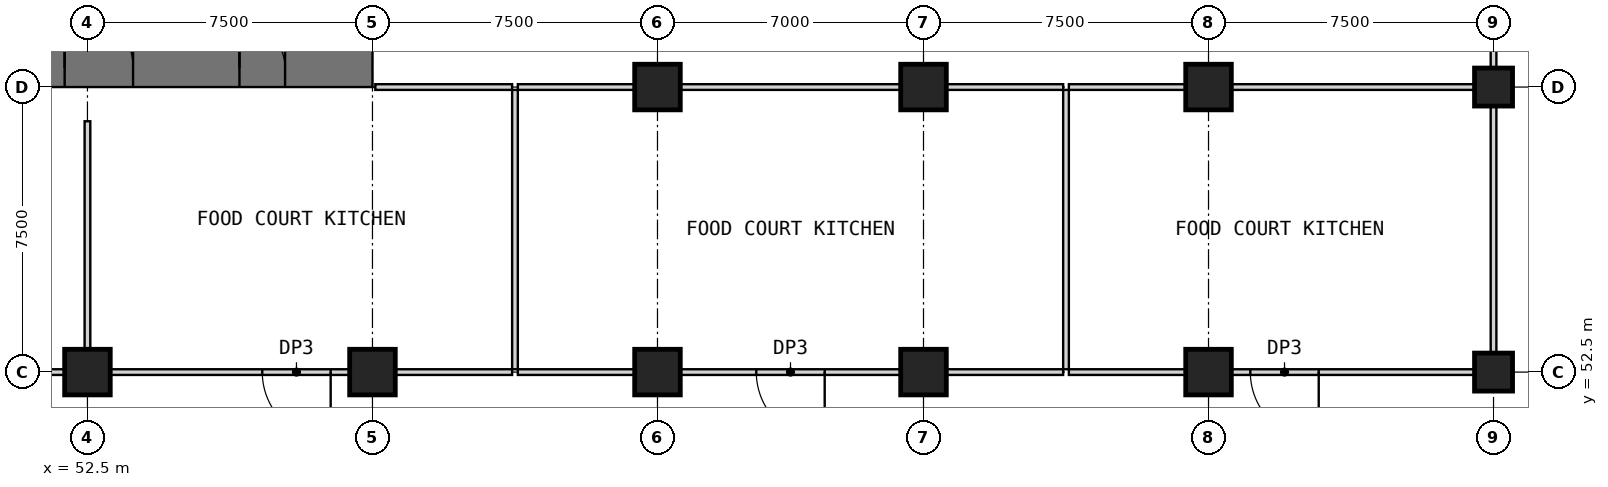
"""IFC4 building model, lengths in metres.
Left out: names, types, materials, properties, quantities, classifications, styles, units other than length and angle.
Written with IfcOpenShell. Run it as: python <this file> out.ifc"""

import sys

from ifc_helpers import new_model, si_unit, direction, frame, frame_2d, origin, origin_2d, place, context, subcontext, project, spatial, rectangle, extrude, element, fill, save


model = new_model("IFC4")
c1 = context("Model", 3, precision=1e-05, world=origin(), true_north=direction((0.0, 1.0)))
c2 = subcontext(c1, "Body", "Model", "MODEL_VIEW")
j1 = project(units=[si_unit("LENGTHUNIT", "METRE"), si_unit("PLANEANGLEUNIT", "RADIAN")], contexts=[c1])
p1 = place(None, origin())
s1 = spatial("IfcSite", under=j1, at=p1, CompositionType="ELEMENT")
p2 = place(p1, origin())
s2 = spatial("IfcBuilding", under=s1, at=p2, CompositionType="ELEMENT")
p3 = place(p2, frame((0.0, 0.0, 18.5)))
s3 = spatial("IfcBuildingStorey", under=s2, at=p3, CompositionType="ELEMENT", Elevation=18.5)
for number, where, z_axis, x_axis in (
    (1, (52.5, 52.5, 0.0), (0.0, 0.0, 1.0), (1.0, 0.0, 0.0)),
    (2, (60.0, 52.5, 0.0), (0.0, 0.0, 1.0), (1.0, 0.0, 0.0)),
    (3, (67.5, 52.5, 0.0), (0.0, 0.0, 1.0), (1.0, 0.0, 0.0)),
    (4, (67.5, 60.0, 0.0), (0.0, 0.0, 1.0), (1.0, 0.0, 0.0)),
    (5, (74.5, 52.5, 0.0), (0.0, 0.0, 1.0), (1.0, 0.0, 0.0)),
    (6, (74.5, 60.0, 0.0), (0.0, 0.0, 1.0), (1.0, 0.0, 0.0)),
    (7, (82.0, 52.5, 0.0), (0.0, 0.0, 1.0), (1.0, 0.0, 0.0)),
    (8, (82.0, 60.0, 0.0), (0.0, 0.0, 1.0), (1.0, 0.0, 0.0)),
):
    element("IfcColumn", number, at=place(p3, frame(where, z_axis=z_axis, x_axis=x_axis)), inside=s3, PredefinedType="COLUMN", context=c2, shape_type="SweptSolid", body=[
        extrude(rectangle(XDim=1.2, YDim=1.2, at=origin_2d()), origin(), (0.0, 0.0, 1.0), 5.0),
    ])
for number, where, z_axis, x_axis in (
    (9, (89.5, 52.5, 0.0), (0.0, 0.0, 1.0), (1.0, 0.0, 0.0)),
    (10, (89.5, 60.0, 0.0), (0.0, 0.0, 1.0), (1.0, 0.0, 0.0)),
):
    element("IfcColumn", number, at=place(p3, frame(where, z_axis=z_axis, x_axis=x_axis)), inside=s3, PredefinedType="COLUMN", context=c2, shape_type="SweptSolid", body=[
        extrude(rectangle(XDim=1.0, YDim=1.0, at=origin_2d()), origin(), (0.0, 0.0, 1.0), 5.0),
    ])
p4 = place(p3, frame((30.0, 60.5, 0.0), z_axis=(0.0, 0.0, 1.0), x_axis=(1.0, 0.0, 0.0)))
e11 = element("IfcWall", 11, at=p4, inside=s3, PredefinedType="SHEAR", context=c2, shape_type="SweptSolid", body=[
    extrude(rectangle(XDim=30.0, YDim=1.0, at=frame_2d((15.0, 0.0))), origin(), (0.0, 0.0, 1.0), 5.0),
])
p5 = place(p4, frame((21.9, 0.0, 0.0)))
e12 = element("IfcOpeningElement", 12, at=p5, cuts=e11, PredefinedType="OPENING", context=c2, shape_type="SweptSolid", body=[
    extrude(rectangle(XDim=1.8, YDim=2.1, at=frame_2d((0.9, 1.05))), frame((0.0, 0.51, 0.0), z_axis=(0.0, -1.0, 0.0), x_axis=(1.0, 0.0, 0.0)), (0.0, 0.0, 1.0), 1.02),
])
p6 = place(p4, frame((26.5, 0.0, 0.0)))
e13 = element("IfcOpeningElement", 13, at=p6, cuts=e11, PredefinedType="OPENING", context=c2, shape_type="SweptSolid", body=[
    extrude(rectangle(XDim=1.2, YDim=2.1, at=frame_2d((0.6, 1.05))), frame((0.0, 0.51, 0.0), z_axis=(0.0, -1.0, 0.0), x_axis=(1.0, 0.0, 0.0)), (0.0, 0.0, 1.0), 1.02),
])
p7 = place(p3, frame((51.9, 52.5, 0.0), z_axis=(0.0, 0.0, 1.0), x_axis=(-1.0, 0.0, 0.0)))
e14 = element("IfcWall", 14, at=p7, inside=s3, PredefinedType="PARTITIONING", context=c2, shape_type="SweptSolid", body=[
    extrude(rectangle(XDim=6.3, YDim=0.15, at=frame_2d((3.15, 0.0))), origin(), (0.0, 0.0, 1.0), 4.7),
])
p8 = place(p7, frame((4.0, 0.0, 0.0)))
e15 = element("IfcOpeningElement", 15, at=p8, cuts=e14, PredefinedType="OPENING", context=c2, shape_type="SweptSolid", body=[
    extrude(rectangle(XDim=1.8, YDim=2.4, at=frame_2d((0.9, 1.2))), frame((0.0, 0.085, 0.0), z_axis=(0.0, -1.0, 0.0), x_axis=(1.0, 0.0, 0.0)), (0.0, 0.0, 1.0), 0.17),
])
p9 = place(p3, frame((59.4, 52.5, 0.0), z_axis=(0.0, 0.0, 1.0), x_axis=(-1.0, 0.0, 0.0)))
e16 = element("IfcWall", 16, at=p9, inside=s3, PredefinedType="PARTITIONING", context=c2, shape_type="SweptSolid", body=[
    extrude(rectangle(XDim=6.3, YDim=0.15, at=frame_2d((3.15, 0.0))), origin(), (0.0, 0.0, 1.0), 4.7),
])
p10 = place(p9, frame((0.5, 0.0, 0.0)))
e17 = element("IfcOpeningElement", 17, at=p10, cuts=e16, PredefinedType="OPENING", context=c2, shape_type="SweptSolid", body=[
    extrude(rectangle(XDim=1.8, YDim=2.4, at=frame_2d((0.9, 1.2))), frame((0.0, 0.085, 0.0), z_axis=(0.0, -1.0, 0.0), x_axis=(1.0, 0.0, 0.0)), (0.0, 0.0, 1.0), 0.17),
])
for number, where, z_axis, x_axis in (
    (18, (60.6, 52.5, 0.0), (0.0, 0.0, 1.0), (1.0, 0.0, 0.0)),
    (19, (63.825, 52.5, 0.0), (0.0, 0.0, 1.0), (1.0, 0.0, 0.0)),
):
    element("IfcWall", number, at=place(p3, frame(where, z_axis=z_axis, x_axis=x_axis)), inside=s3, PredefinedType="PARTITIONING", context=c2, shape_type="SweptSolid", body=[
        extrude(rectangle(XDim=3.075, YDim=0.15, at=frame_2d((1.538, 0.0))), origin(), (0.0, 0.0, 1.0), 4.7),
    ])
p11 = place(p3, frame((73.9, 52.5, 0.0), z_axis=(0.0, 0.0, 1.0), x_axis=(-1.0, 0.0, 0.0)))
e20 = element("IfcWall", 20, at=p11, inside=s3, PredefinedType="PARTITIONING", context=c2, shape_type="SweptSolid", body=[
    extrude(rectangle(XDim=5.8, YDim=0.15, at=frame_2d((2.9, 0.0))), origin(), (0.0, 0.0, 1.0), 4.7),
])
p12 = place(p11, frame((2.0, 0.0, 0.0)))
e21 = element("IfcOpeningElement", 21, at=p12, cuts=e20, PredefinedType="OPENING", context=c2, shape_type="SweptSolid", body=[
    extrude(rectangle(XDim=1.8, YDim=2.4, at=frame_2d((0.9, 1.2))), frame((0.0, 0.085, 0.0), z_axis=(0.0, -1.0, 0.0), x_axis=(1.0, 0.0, 0.0)), (0.0, 0.0, 1.0), 0.17),
])
for number, where, z_axis, x_axis in (
    (22, (75.1, 52.5, 0.0), (0.0, 0.0, 1.0), (1.0, 0.0, 0.0)),
    (23, (78.325, 52.5, 0.0), (0.0, 0.0, 1.0), (1.0, 0.0, 0.0)),
):
    element("IfcWall", number, at=place(p3, frame(where, z_axis=z_axis, x_axis=x_axis)), inside=s3, PredefinedType="PARTITIONING", context=c2, shape_type="SweptSolid", body=[
        extrude(rectangle(XDim=3.075, YDim=0.15, at=frame_2d((1.538, 0.0))), origin(), (0.0, 0.0, 1.0), 4.7),
    ])
p13 = place(p3, frame((89.0, 52.5, 0.0), z_axis=(0.0, 0.0, 1.0), x_axis=(-1.0, 0.0, 0.0)))
e24 = element("IfcWall", 24, at=p13, inside=s3, PredefinedType="PARTITIONING", context=c2, shape_type="SweptSolid", body=[
    extrude(rectangle(XDim=6.4, YDim=0.15, at=frame_2d((3.2, 0.0))), origin(), (0.0, 0.0, 1.0), 4.7),
])
p14 = place(p13, frame((4.1, 0.0, 0.0)))
e25 = element("IfcOpeningElement", 25, at=p14, cuts=e24, PredefinedType="OPENING", context=c2, shape_type="SweptSolid", body=[
    extrude(rectangle(XDim=1.8, YDim=2.4, at=frame_2d((0.9, 1.2))), frame((0.0, 0.085, 0.0), z_axis=(0.0, -1.0, 0.0), x_axis=(1.0, 0.0, 0.0)), (0.0, 0.0, 1.0), 0.17),
])
p15 = place(p3, frame((60.075, 60.0, 0.0), z_axis=(0.0, 0.0, 1.0), x_axis=(1.0, 0.0, 0.0)))
e26 = element("IfcWall", 26, at=p15, inside=s3, PredefinedType="PARTITIONING", context=c2, shape_type="SweptSolid", body=[
    extrude(rectangle(XDim=3.6, YDim=0.15, at=frame_2d((1.8, 0.0))), origin(), (0.0, 0.0, 1.0), 4.7),
])
p16 = place(p3, frame((63.825, 60.0, 0.0), z_axis=(0.0, 0.0, 1.0), x_axis=(1.0, 0.0, 0.0)))
e27 = element("IfcWall", 27, at=p16, inside=s3, PredefinedType="PARTITIONING", context=c2, shape_type="SweptSolid", body=[
    extrude(rectangle(XDim=3.075, YDim=0.15, at=frame_2d((1.538, 0.0))), origin(), (0.0, 0.0, 1.0), 4.7),
])
p17 = place(p3, frame((68.1, 60.0, 0.0), z_axis=(0.0, 0.0, 1.0), x_axis=(1.0, 0.0, 0.0)))
e28 = element("IfcWall", 28, at=p17, inside=s3, PredefinedType="PARTITIONING", context=c2, shape_type="SweptSolid", body=[
    extrude(rectangle(XDim=5.8, YDim=0.15, at=frame_2d((2.9, 0.0))), origin(), (0.0, 0.0, 1.0), 4.7),
])
for number, where, z_axis, x_axis in (
    (29, (75.1, 60.0, 0.0), (0.0, 0.0, 1.0), (1.0, 0.0, 0.0)),
    (30, (78.325, 60.0, 0.0), (0.0, 0.0, 1.0), (1.0, 0.0, 0.0)),
):
    element("IfcWall", number, at=place(p3, frame(where, z_axis=z_axis, x_axis=x_axis)), inside=s3, PredefinedType="PARTITIONING", context=c2, shape_type="SweptSolid", body=[
        extrude(rectangle(XDim=3.075, YDim=0.15, at=frame_2d((1.538, 0.0))), origin(), (0.0, 0.0, 1.0), 4.7),
    ])
p18 = place(p3, frame((82.6, 60.0, 0.0), z_axis=(0.0, 0.0, 1.0), x_axis=(1.0, 0.0, 0.0)))
e31 = element("IfcWall", 31, at=p18, inside=s3, PredefinedType="PARTITIONING", context=c2, shape_type="SweptSolid", body=[
    extrude(rectangle(XDim=6.4, YDim=0.15, at=frame_2d((3.2, 0.0))), origin(), (0.0, 0.0, 1.0), 4.7),
])
p19 = place(p3, frame((78.25, 52.575, 0.0), z_axis=(0.0, 0.0, 1.0), x_axis=(0.0, 1.0, 0.0)))
e32 = element("IfcWall", 32, at=p19, inside=s3, PredefinedType="PARTITIONING", context=c2, shape_type="SweptSolid", body=[
    extrude(rectangle(XDim=7.35, YDim=0.15, at=frame_2d((3.675, 0.0))), origin(), (0.0, 0.0, 1.0), 4.7),
])
for number, where, z_axis, x_axis in (
    (33, (89.5, 53.0, 0.0), (0.0, 0.0, 1.0), (0.0, 1.0, 0.0)),
    (34, (89.5, 60.5, 0.0), (0.0, 0.0, 1.0), (0.0, 1.0, 0.0)),
):
    element("IfcWall", number, at=place(p3, frame(where, z_axis=z_axis, x_axis=x_axis)), inside=s3, PredefinedType="PARTITIONING", context=c2, shape_type="SweptSolid", body=[
        extrude(rectangle(XDim=6.5, YDim=0.15, at=frame_2d((3.25, 0.0))), origin(), (0.0, 0.0, 1.0), 4.7),
    ])
p20 = place(p3, frame((52.5, 53.1, 0.0), z_axis=(0.0, 0.0, 1.0), x_axis=(0.0, 1.0, 0.0)))
e35 = element("IfcWall", 35, at=p20, inside=s3, PredefinedType="PARTITIONING", context=c2, shape_type="SweptSolid", body=[
    extrude(rectangle(XDim=6.0, YDim=0.15, at=frame_2d((3.0, 0.0))), origin(), (0.0, 0.0, 1.0), 4.7),
])
p21 = place(p3, frame((63.75, 52.575, 0.0), z_axis=(0.0, 0.0, 1.0), x_axis=(0.0, 1.0, 0.0)))
e36 = element("IfcWall", 36, at=p21, inside=s3, PredefinedType="PARTITIONING", context=c2, shape_type="SweptSolid", body=[
    extrude(rectangle(XDim=7.35, YDim=0.15, at=frame_2d((3.675, 0.0))), origin(), (0.0, 0.0, 1.0), 4.7),
])
p22 = place(p5, origin())
e37 = element("IfcDoor", 37, at=p22, inside=s3, OperationType="DOUBLE_DOOR_SINGLE_SWING", PredefinedType="DOOR", context=c2, shape_type="SweptSolid", body=[
    extrude(rectangle(XDim=1.8, YDim=2.1, at=frame_2d((0.9, 1.05))), frame((0.0, 0.025, 0.0), z_axis=(0.0, -1.0, 0.0), x_axis=(1.0, 0.0, 0.0)), (0.0, 0.0, 1.0), 0.05),
])
fill(e12, e37)
p23 = place(p6, origin())
e38 = element("IfcDoor", 38, at=p23, inside=s3, OperationType="SINGLE_SWING_LEFT", PredefinedType="DOOR", context=c2, shape_type="SweptSolid", body=[
    extrude(rectangle(XDim=1.2, YDim=2.1, at=frame_2d((0.6, 1.05))), frame((0.0, 0.025, 0.0), z_axis=(0.0, -1.0, 0.0), x_axis=(1.0, 0.0, 0.0)), (0.0, 0.0, 1.0), 0.05),
])
fill(e13, e38)
p24 = place(p10, origin())
e39 = element("IfcDoor", 39, at=p24, inside=s3, OperationType="SINGLE_SWING_LEFT", PredefinedType="DOOR", context=c2, shape_type="SweptSolid", body=[
    extrude(rectangle(XDim=1.8, YDim=2.4, at=frame_2d((0.9, 1.2))), frame((0.0, 0.025, 0.0), z_axis=(0.0, -1.0, 0.0), x_axis=(1.0, 0.0, 0.0)), (0.0, 0.0, 1.0), 0.05),
])
fill(e17, e39)
p25 = place(p12, origin())
e40 = element("IfcDoor", 40, at=p25, inside=s3, OperationType="SINGLE_SWING_LEFT", PredefinedType="DOOR", context=c2, shape_type="SweptSolid", body=[
    extrude(rectangle(XDim=1.8, YDim=2.4, at=frame_2d((0.9, 1.2))), frame((0.0, 0.025, 0.0), z_axis=(0.0, -1.0, 0.0), x_axis=(1.0, 0.0, 0.0)), (0.0, 0.0, 1.0), 0.05),
])
fill(e21, e40)
p26 = place(p14, origin())
e41 = element("IfcDoor", 41, at=p26, inside=s3, OperationType="SINGLE_SWING_LEFT", PredefinedType="DOOR", context=c2, shape_type="SweptSolid", body=[
    extrude(rectangle(XDim=1.8, YDim=2.4, at=frame_2d((0.9, 1.2))), frame((0.0, 0.025, 0.0), z_axis=(0.0, -1.0, 0.0), x_axis=(1.0, 0.0, 0.0)), (0.0, 0.0, 1.0), 0.05),
])
fill(e25, e41)
save(model, sys.argv[1])
